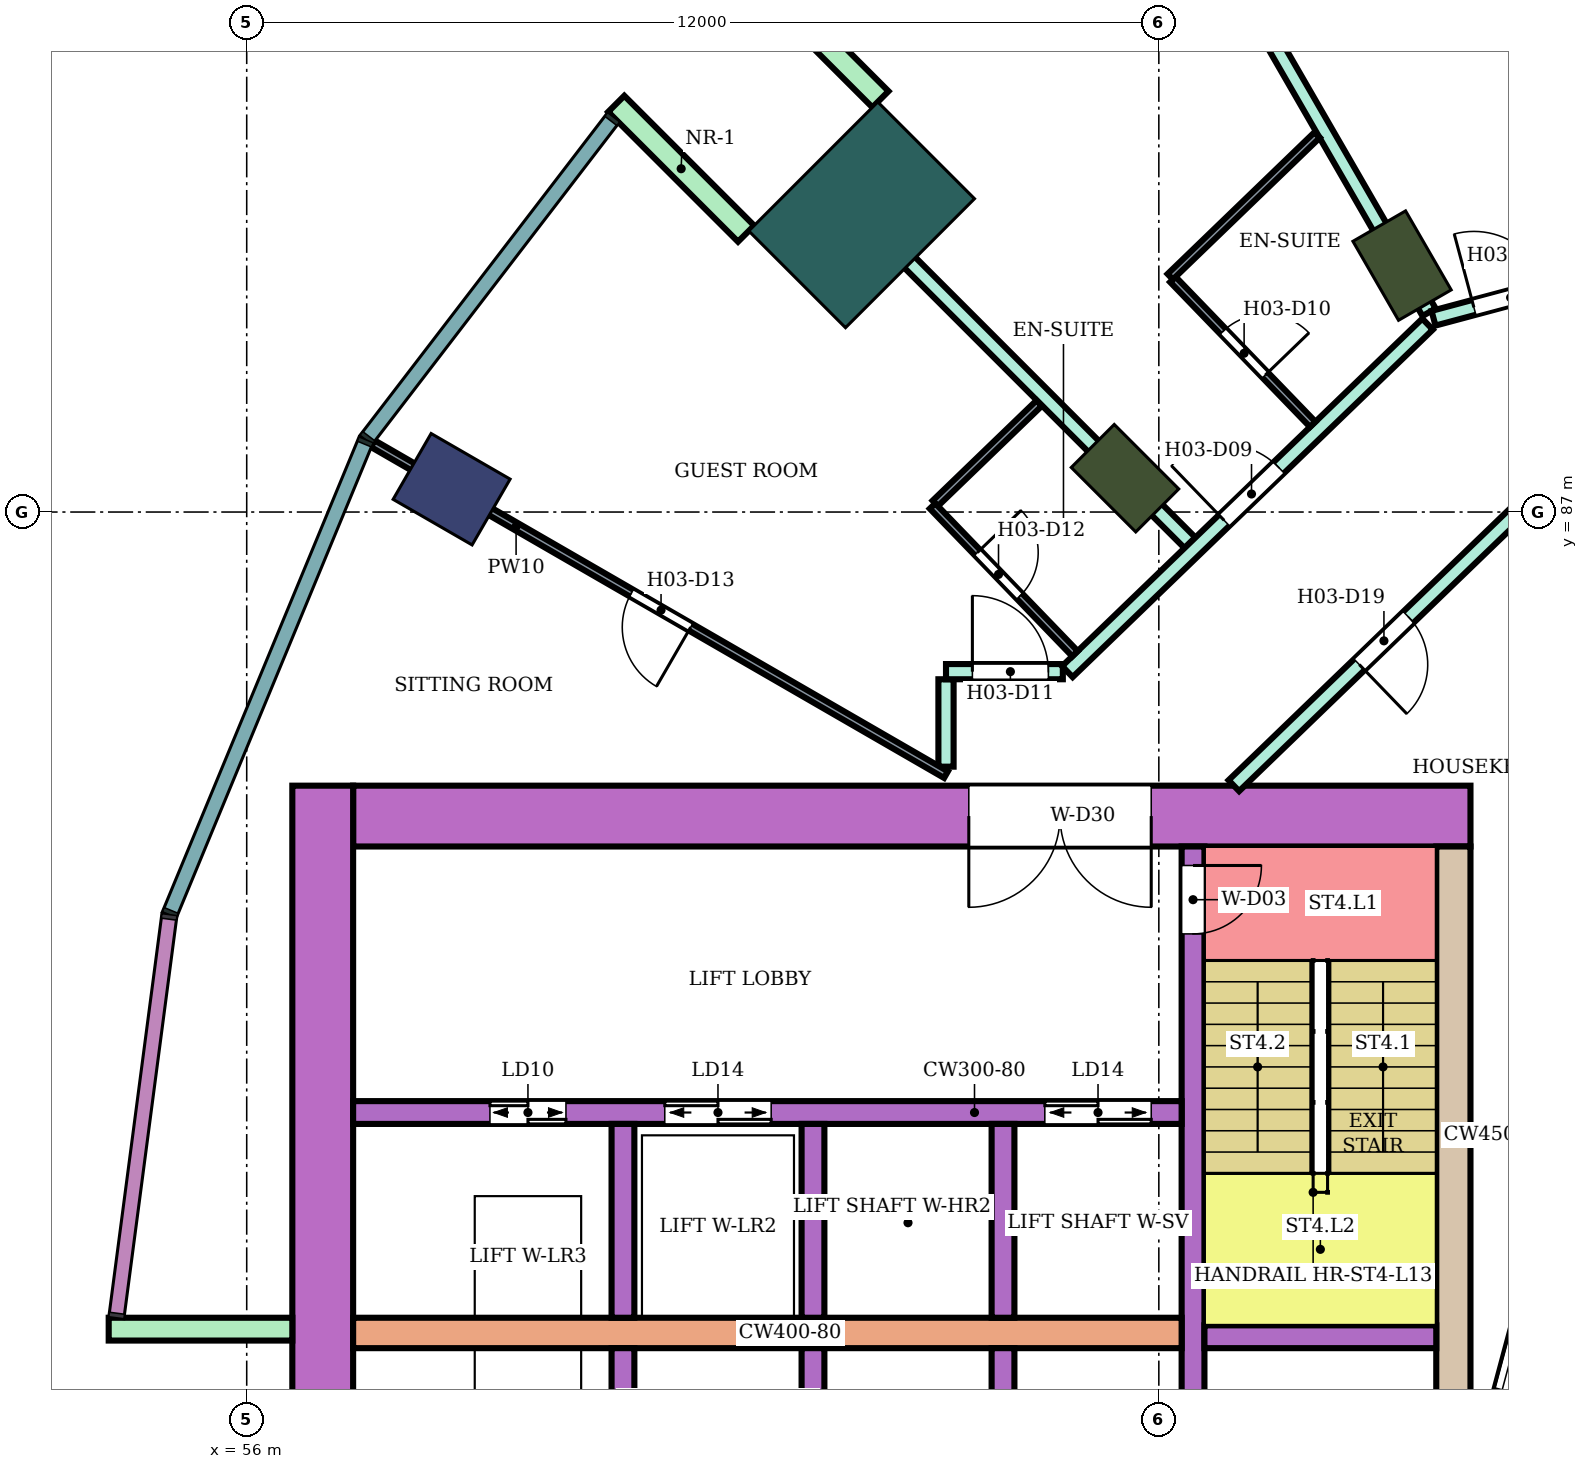
"""IFC4 building model, lengths in metres.
Left out: names, types, materials, properties, quantities, classifications, styles, units other than length and angle.
Written with IfcOpenShell. Run it as: python <this file> out.ifc"""

import sys

from ifc_helpers import new_model, si_unit, direction, frame, frame_2d, origin, origin_2d, place, context, subcontext, project, spatial, rectangle, extrude, element, fill, save


model = new_model("IFC4")
c1 = context("Model", 3, precision=1e-05, world=origin(), true_north=direction((0.0, 1.0)))
c2 = subcontext(c1, "Body", "Model", "MODEL_VIEW")
j1 = project(units=[si_unit("LENGTHUNIT", "METRE"), si_unit("PLANEANGLEUNIT", "RADIAN")], contexts=[c1])
p1 = place(None, origin())
s1 = spatial("IfcSite", under=j1, at=p1, CompositionType="ELEMENT")
p2 = place(p1, origin())
s2 = spatial("IfcBuilding", under=s1, at=p2, CompositionType="ELEMENT")
p3 = place(p2, frame((0.0, 0.0, 59.2)))
s3 = spatial("IfcBuildingStorey", under=s2, at=p3, CompositionType="ELEMENT", Elevation=59.2)
p4 = place(p3, frame((58.696, 87.3, 0.0), z_axis=(0.0, 0.0, 1.0), x_axis=(-0.866025403784, 0.5, 0.0)))
e1 = element("IfcColumn", 1, at=p4, inside=s3, PredefinedType="COLUMN", context=c2, shape_type="SweptSolid", body=[
    extrude(rectangle(XDim=1.2, YDim=1.0, at=origin_2d()), origin(), (0.0, 0.0, 1.0), 3.8),
])
for number, where, z_axis, x_axis in (
    (2, (71.2, 90.242, 0.0), (0.0, 0.0, 1.0), (-0.5, 0.866, 0.0)),
    (3, (67.555, 87.445, 0.0), (0.0, 0.0, 1.0), (-0.707, 0.707, 0.0)),
):
    element("IfcColumn", number, at=place(p3, frame(where, z_axis=z_axis, x_axis=x_axis)), inside=s3, PredefinedType="COLUMN", context=c2, shape_type="SweptSolid", body=[
        extrude(rectangle(XDim=1.2, YDim=0.8, at=origin_2d()), origin(), (0.0, 0.0, 1.0), 3.8),
    ])
p5 = place(p3, frame((64.09, 90.91, 0.0), z_axis=(0.0, 0.0, 1.0), x_axis=(-0.707106781187, 0.707106781187, 0.0)))
e4 = element("IfcColumn", 4, at=p5, inside=s3, PredefinedType="COLUMN", context=c2, shape_type="SweptSolid", body=[
    extrude(rectangle(XDim=1.8, YDim=2.4, at=origin_2d()), origin(), (0.0, 0.0, 1.0), 3.8),
])
p6 = place(p3, frame((72.1, 83.0, 0.0), z_axis=(0.0, 0.0, 1.0), x_axis=(-1.0, 0.0, 0.0)))
e5 = element("IfcWall", 5, at=p6, inside=s3, PredefinedType="SHEAR", context=c2, shape_type="SweptSolid", body=[
    extrude(rectangle(XDim=14.7, YDim=0.8, at=frame_2d((7.35, 0.0))), origin(), (0.0, 0.0, 1.0), 3.48),
])
p7 = place(p6, frame((4.2, 0.0, 0.0)))
e6 = element("IfcOpeningElement", 6, at=p7, cuts=e5, PredefinedType="OPENING", context=c2, shape_type="SweptSolid", body=[
    extrude(rectangle(XDim=2.4, YDim=2.4, at=frame_2d((1.2, 1.2))), frame((0.0, 0.41, 0.0), z_axis=(0.0, -1.0, 0.0), x_axis=(1.0, 0.0, 0.0)), (0.0, 0.0, 1.0), 0.82),
])
p8 = place(p3, frame((71.875, 82.6, 0.0), z_axis=(0.0, 0.0, 1.0), x_axis=(0.0, -1.0, 0.0)))
e7 = element("IfcWall", 7, at=p8, inside=s3, PredefinedType="SHEAR", context=c2, shape_type="SweptSolid", body=[
    extrude(rectangle(XDim=7.6, YDim=0.45, at=frame_2d((3.8, 0.0))), origin(), (0.0, 0.0, 1.0), 3.48),
])
p9 = place(p3, frame((57.0, 83.4, 0.0), z_axis=(0.0, 0.0, 1.0), x_axis=(0.0, -1.0, 0.0)))
e8 = element("IfcWall", 8, at=p9, inside=s3, PredefinedType="SHEAR", context=c2, shape_type="SweptSolid", body=[
    extrude(rectangle(XDim=16.8, YDim=0.8, at=frame_2d((8.4, 0.0))), origin(), (0.0, 0.0, 1.0), 3.48),
])
p10 = place(p3, frame((68.45, 82.6, 0.0), z_axis=(0.0, 0.0, 1.0), x_axis=(0.0, -1.0, 0.0)))
e9 = element("IfcWall", 9, at=p10, inside=s3, PredefinedType="SHEAR", context=c2, shape_type="SweptSolid", body=[
    extrude(rectangle(XDim=7.6, YDim=0.3, at=frame_2d((3.8, 0.0))), origin(), (0.0, 0.0, 1.0), 3.48),
])
p11 = place(p10, frame((0.25, 0.0, 0.0)))
e10 = element("IfcOpeningElement", 10, at=p11, cuts=e9, PredefinedType="OPENING", context=c2, shape_type="SweptSolid", body=[
    extrude(rectangle(XDim=0.9, YDim=2.1, at=frame_2d((0.45, 1.05))), frame((0.0, 0.16, 0.0), z_axis=(0.0, -1.0, 0.0), x_axis=(1.0, 0.0, 0.0)), (0.0, 0.0, 1.0), 0.32),
])
p12 = place(p3, frame((71.65, 76.15, 0.0), z_axis=(0.0, 0.0, 1.0), x_axis=(-1.0, 0.0, 0.0)))
e11 = element("IfcWall", 11, at=p12, inside=s3, PredefinedType="SHEAR", context=c2, shape_type="SweptSolid", body=[
    extrude(rectangle(XDim=3.05, YDim=0.3, at=frame_2d((1.525, 0.0))), origin(), (0.0, 0.0, 1.0), 3.48),
])
p13 = place(p3, frame((68.3, 76.2, 0.0), z_axis=(0.0, 0.0, 1.0), x_axis=(-1.0, 0.0, 0.0)))
e12 = element("IfcWall", 12, at=p13, inside=s3, PredefinedType="SHEAR", context=c2, shape_type="SweptSolid", body=[
    extrude(rectangle(XDim=10.9, YDim=0.4, at=frame_2d((5.45, 0.0))), origin(), (0.0, 0.0, 1.0), 3.48),
])
p14 = place(p3, frame((68.3, 79.1, 0.0), z_axis=(0.0, 0.0, 1.0), x_axis=(-1.0, 0.0, 0.0)))
e13 = element("IfcWall", 13, at=p14, inside=s3, PredefinedType="SHEAR", context=c2, shape_type="SweptSolid", body=[
    extrude(rectangle(XDim=10.9, YDim=0.3, at=frame_2d((5.45, 0.0))), origin(), (0.0, 0.0, 1.0), 3.48),
])
p15 = place(p14, frame((0.4, 0.0, 0.0)))
e14 = element("IfcOpeningElement", 14, at=p15, cuts=e13, PredefinedType="OPENING", context=c2, shape_type="SweptSolid", body=[
    extrude(rectangle(XDim=1.4, YDim=2.1, at=frame_2d((0.7, 1.05))), frame((0.0, 0.16, 0.0), z_axis=(0.0, -1.0, 0.0), x_axis=(1.0, 0.0, 0.0)), (0.0, 0.0, 1.0), 0.32),
])
p16 = place(p14, frame((5.4, 0.0, 0.0)))
e15 = element("IfcOpeningElement", 15, at=p16, cuts=e13, PredefinedType="OPENING", context=c2, shape_type="SweptSolid", body=[
    extrude(rectangle(XDim=1.4, YDim=2.1, at=frame_2d((0.7, 1.05))), frame((0.0, 0.16, 0.0), z_axis=(0.0, -1.0, 0.0), x_axis=(1.0, 0.0, 0.0)), (0.0, 0.0, 1.0), 0.32),
])
p17 = place(p14, frame((8.1, 0.0, 0.0)))
e16 = element("IfcOpeningElement", 16, at=p17, cuts=e13, PredefinedType="OPENING", context=c2, shape_type="SweptSolid", body=[
    extrude(rectangle(XDim=1.0, YDim=2.1, at=frame_2d((0.5, 1.05))), frame((0.0, 0.16, 0.0), z_axis=(0.0, -1.0, 0.0), x_axis=(1.0, 0.0, 0.0)), (0.0, 0.0, 1.0), 0.32),
])
for number, where, z_axis, x_axis in (
    (17, (65.95, 76.0, 0.0), (0.0, 0.0, 1.0), (0.0, -1.0, 0.0)),
    (18, (63.45, 76.0, 0.0), (0.0, 0.0, 1.0), (0.0, -1.0, 0.0)),
    (19, (60.95, 76.0, 0.0), (0.0, 0.0, 1.0), (0.0, -1.0, 0.0)),
    (20, (65.95, 78.95, 0.0), (0.0, 0.0, 1.0), (0.0, -1.0, 0.0)),
    (21, (63.45, 78.95, 0.0), (0.0, 0.0, 1.0), (0.0, -1.0, 0.0)),
    (22, (60.95, 78.95, 0.0), (0.0, 0.0, 1.0), (0.0, -1.0, 0.0)),
):
    element("IfcWall", number, at=place(p3, frame(where, z_axis=z_axis, x_axis=x_axis)), inside=s3, PredefinedType="SHEAR", context=c2, shape_type="SweptSolid", body=[
        extrude(rectangle(XDim=2.55, YDim=0.3, at=frame_2d((1.275, 0.0))), origin(), (0.0, 0.0, 1.0), 3.48),
    ])
for number, where, z_axis, x_axis in (
    (23, (64.338, 92.43, 0.0), (0.0, 0.0, 1.0), (-0.707, 0.707, 0.0)),
    (24, (62.57, 90.662, 0.0), (0.0, 0.0, 1.0), (-0.707, 0.707, 0.0)),
    (25, (56.6, 76.25, 0.0), (0.0, 0.0, 1.0), (-1.0, 0.0, 0.0)),
):
    element("IfcWall", number, at=place(p3, frame(where, z_axis=z_axis, x_axis=x_axis)), inside=s3, PredefinedType="NOTDEFINED", context=c2, shape_type="SweptSolid", body=[
        extrude(rectangle(XDim=2.416, YDim=0.3, at=frame_2d((1.208, 0.0))), origin(), (0.0, 0.0, 1.0), 3.8),
    ])
p18 = place(p3, frame((73.415, 78.802, 0.0), z_axis=(0.0, 0.0, 1.0), x_axis=(-0.258789828301, -0.965933654434, 0.0)))
e26 = element("IfcWall", 26, at=p18, inside=s3, PredefinedType="NOTDEFINED", context=c2, shape_type="SweptSolid", body=[
    extrude(rectangle(XDim=3.936, YDim=0.2, at=frame_2d((1.968, 0.0))), origin(), (0.0, 0.0, 1.0), 3.8),
])
p19 = place(p18, frame((0.468, 0.0, 0.9)))
e27 = element("IfcOpeningElement", 27, at=p19, cuts=e26, PredefinedType="OPENING", context=c2, shape_type="SweptSolid", body=[
    extrude(rectangle(XDim=3.0, YDim=2.3, at=frame_2d((1.5, 1.15))), frame((0.0, 0.11, 0.0), z_axis=(0.0, -1.0, 0.0), x_axis=(1.0, 0.0, 0.0)), (0.0, 0.0, 1.0), 0.22),
])
p20 = place(p3, frame((63.598, 91.408, 0.0), z_axis=(0.0, 0.0, 1.0), x_axis=(0.706999146394, -0.707214399597, 0.0)))
e28 = element("IfcWall", 28, at=p20, inside=s3, PredefinedType="PARTITIONING", context=c2, shape_type="SweptSolid", body=[
    extrude(rectangle(XDim=6.805, YDim=0.2, at=frame_2d((3.403, 0.0))), origin(), (0.0, 0.0, 1.0), 3.35),
])
p21 = place(p3, frame((65.2, 83.65, 0.0), z_axis=(0.0, 0.0, 1.0), x_axis=(0.0, 1.0, 0.0)))
e29 = element("IfcWall", 29, at=p21, inside=s3, PredefinedType="PARTITIONING", context=c2, shape_type="SweptSolid", body=[
    extrude(rectangle(XDim=1.15, YDim=0.2, at=frame_2d((0.575, 0.0))), origin(), (0.0, 0.0, 1.0), 3.35),
])
p22 = place(p3, frame((65.2, 84.9, 0.0), z_axis=(0.0, 0.0, 1.0), x_axis=(1.0, 0.0, 0.0)))
e30 = element("IfcWall", 30, at=p22, inside=s3, PredefinedType="PARTITIONING", context=c2, shape_type="SweptSolid", body=[
    extrude(rectangle(XDim=1.537, YDim=0.2, at=frame_2d((0.769, 0.0))), origin(), (0.0, 0.0, 1.0), 3.35),
])
p23 = place(p22, frame((0.347, 0.0, 0.0)))
e31 = element("IfcOpeningElement", 31, at=p23, cuts=e30, PredefinedType="OPENING", context=c2, shape_type="SweptSolid", body=[
    extrude(rectangle(XDim=1.0, YDim=2.1, at=frame_2d((0.5, 1.05))), frame((0.0, 0.11, 0.0), z_axis=(0.0, -1.0, 0.0), x_axis=(1.0, 0.0, 0.0)), (0.0, 0.0, 1.0), 0.22),
])
p24 = place(p3, frame((66.797, 84.9, 0.0), z_axis=(0.0, 0.0, 1.0), x_axis=(0.719692092412, 0.694293376116, 0.0)))
e32 = element("IfcWall", 32, at=p24, inside=s3, PredefinedType="PARTITIONING", context=c2, shape_type="SweptSolid", body=[
    extrude(rectangle(XDim=6.584, YDim=0.2, at=frame_2d((3.292, 0.0))), origin(), (0.0, 0.0, 1.0), 3.35),
])
p25 = place(p24, frame((2.866, 0.0, 0.0)))
e33 = element("IfcOpeningElement", 33, at=p25, cuts=e32, PredefinedType="OPENING", context=c2, shape_type="SweptSolid", body=[
    extrude(rectangle(XDim=1.0, YDim=2.1, at=frame_2d((0.5, 1.05))), frame((0.0, 0.11, 0.0), z_axis=(0.0, -1.0, 0.0), x_axis=(1.0, 0.0, 0.0)), (0.0, 0.0, 1.0), 0.22),
])
p26 = place(p3, frame((67.103, 97.342, 0.0), z_axis=(0.0, 0.0, 1.0), x_axis=(0.499906738326, -0.866079241742, 0.0)))
e34 = element("IfcWall", 34, at=p26, inside=s3, PredefinedType="PARTITIONING", context=c2, shape_type="SweptSolid", body=[
    extrude(rectangle(XDim=8.907, YDim=0.2, at=frame_2d((4.454, 0.0))), origin(), (0.0, 0.0, 1.0), 3.35),
])
p27 = place(p3, frame((68.987, 83.4, 0.0), z_axis=(0.0, 0.0, 1.0), x_axis=(0.719547721855, 0.694442996922, 0.0)))
e35 = element("IfcWall", 35, at=p27, inside=s3, PredefinedType="PARTITIONING", context=c2, shape_type="SweptSolid", body=[
    extrude(rectangle(XDim=5.378, YDim=0.2, at=frame_2d((2.689, 0.0))), origin(), (0.0, 0.0, 1.0), 3.35),
])
p28 = place(p27, frame((2.294, 0.0, 0.0)))
e36 = element("IfcOpeningElement", 36, at=p28, cuts=e35, PredefinedType="OPENING", context=c2, shape_type="SweptSolid", body=[
    extrude(rectangle(XDim=0.9, YDim=2.1, at=frame_2d((0.45, 1.05))), frame((0.0, 0.11, 0.0), z_axis=(0.0, -1.0, 0.0), x_axis=(1.0, 0.0, 0.0)), (0.0, 0.0, 1.0), 0.22),
])
p29 = place(p3, frame((71.614, 89.55, 0.0), z_axis=(0.0, 0.0, 1.0), x_axis=(0.965967958589, 0.258661753994, 0.0)))
e37 = element("IfcWall", 37, at=p29, inside=s3, PredefinedType="PARTITIONING", context=c2, shape_type="SweptSolid", body=[
    extrude(rectangle(XDim=8.592, YDim=0.2, at=frame_2d((4.296, 0.0))), origin(), (0.0, 0.0, 1.0), 3.35),
])
p30 = place(p29, frame((0.55, 0.0, 0.0)))
e38 = element("IfcOpeningElement", 38, at=p30, cuts=e37, PredefinedType="OPENING", context=c2, shape_type="SweptSolid", body=[
    extrude(rectangle(XDim=1.0, YDim=2.1, at=frame_2d((0.5, 1.05))), frame((0.0, 0.11, 0.0), z_axis=(0.0, -1.0, 0.0), x_axis=(1.0, 0.0, 0.0)), (0.0, 0.0, 1.0), 0.22),
])
p31 = place(p3, frame((57.659, 87.899, 0.0), z_axis=(0.0, 0.0, 1.0), x_axis=(0.86602264145, -0.500004784474, 0.0)))
e39 = element("IfcWall", 39, at=p31, inside=s3, PredefinedType="PARTITIONING", context=c2, shape_type="SweptSolid", body=[
    extrude(rectangle(XDim=8.708, YDim=0.1, at=frame_2d((4.354, 0.0))), origin(), (0.0, 0.0, 1.0), 3.35),
])
p32 = place(p31, frame((3.929, 0.0, 0.0)))
e40 = element("IfcOpeningElement", 40, at=p32, cuts=e39, PredefinedType="OPENING", context=c2, shape_type="SweptSolid", body=[
    extrude(rectangle(XDim=0.9, YDim=2.1, at=frame_2d((0.45, 1.05))), frame((0.0, 0.06, 0.0), z_axis=(0.0, -1.0, 0.0), x_axis=(1.0, 0.0, 0.0)), (0.0, 0.0, 1.0), 0.12),
])
p33 = place(p3, frame((65.059, 87.114, 0.0), z_axis=(0.0, 0.0, 1.0), x_axis=(0.719715847356, 0.694268751324, 0.0)))
e41 = element("IfcWall", 41, at=p33, inside=s3, PredefinedType="PARTITIONING", context=c2, shape_type="SweptSolid", body=[
    extrude(rectangle(XDim=1.9, YDim=0.1, at=frame_2d((0.95, 0.0))), origin(), (0.0, 0.0, 1.0), 3.35),
])
p34 = place(p3, frame((65.023, 87.079, 0.0), z_axis=(0.0, 0.0, 1.0), x_axis=(0.694287838235, -0.719697434815, 0.0)))
e42 = element("IfcWall", 42, at=p34, inside=s3, PredefinedType="PARTITIONING", context=c2, shape_type="SweptSolid", body=[
    extrude(rectangle(XDim=2.7, YDim=0.1, at=frame_2d((1.35, 0.0))), origin(), (0.0, 0.0, 1.0), 3.35),
])
p35 = place(p34, frame((0.85, 0.0, 0.0)))
e43 = element("IfcOpeningElement", 43, at=p35, cuts=e42, PredefinedType="OPENING", context=c2, shape_type="SweptSolid", body=[
    extrude(rectangle(XDim=0.8, YDim=2.1, at=frame_2d((0.4, 1.05))), frame((0.0, 0.06, 0.0), z_axis=(0.0, -1.0, 0.0), x_axis=(1.0, 0.0, 0.0)), (0.0, 0.0, 1.0), 0.12),
])
p36 = place(p3, frame((68.185, 90.06, 0.0), z_axis=(0.0, 0.0, 1.0), x_axis=(0.69446127412, -0.719530081892, 0.0)))
e44 = element("IfcWall", 44, at=p36, inside=s3, PredefinedType="PARTITIONING", context=c2, shape_type="SweptSolid", body=[
    extrude(rectangle(XDim=2.649, YDim=0.1, at=frame_2d((1.324, 0.0))), origin(), (0.0, 0.0, 1.0), 3.35),
])
p37 = place(p36, frame((0.95, 0.0, 0.0)))
e45 = element("IfcOpeningElement", 45, at=p37, cuts=e44, PredefinedType="OPENING", context=c2, shape_type="SweptSolid", body=[
    extrude(rectangle(XDim=0.8, YDim=2.1, at=frame_2d((0.4, 1.05))), frame((0.0, 0.06, 0.0), z_axis=(0.0, -1.0, 0.0), x_axis=(1.0, 0.0, 0.0)), (0.0, 0.0, 1.0), 0.12),
])
p38 = place(p3, frame((68.15, 90.096, 0.0), z_axis=(0.0, 0.0, 1.0), x_axis=(0.719667544954, 0.694318820672, 0.0)))
e46 = element("IfcWall", 46, at=p38, inside=s3, PredefinedType="PARTITIONING", context=c2, shape_type="SweptSolid", body=[
    extrude(rectangle(XDim=2.687, YDim=0.1, at=frame_2d((1.344, 0.0))), origin(), (0.0, 0.0, 1.0), 3.35),
])
p39 = place(p19, origin())
e47 = element("IfcWindow", 47, at=p39, inside=s3, PartitioningType="SINGLE_PANEL", PredefinedType="WINDOW", context=c2, shape_type="SweptSolid", body=[
    extrude(rectangle(XDim=3.0, YDim=2.3, at=frame_2d((1.5, 1.15))), frame((0.0, 0.03, 0.0), z_axis=(0.0, -1.0, 0.0), x_axis=(1.0, 0.0, 0.0)), (0.0, 0.0, 1.0), 0.06),
])
fill(e27, e47)
p40 = place(p30, origin())
e48 = element("IfcDoor", 48, at=p40, inside=s3, OperationType="SINGLE_SWING_LEFT", PredefinedType="DOOR", context=c2, shape_type="SweptSolid", body=[
    extrude(rectangle(XDim=1.0, YDim=2.1, at=frame_2d((0.5, 1.05))), frame((0.0, 0.025, 0.0), z_axis=(0.0, -1.0, 0.0), x_axis=(1.0, 0.0, 0.0)), (0.0, 0.0, 1.0), 0.05),
])
fill(e38, e48)
p41 = place(p25, origin())
e49 = element("IfcDoor", 49, at=p41, inside=s3, OperationType="SINGLE_SWING_LEFT", PredefinedType="DOOR", context=c2, shape_type="SweptSolid", body=[
    extrude(rectangle(XDim=1.0, YDim=2.1, at=frame_2d((0.5, 1.05))), frame((0.0, 0.025, 0.0), z_axis=(0.0, -1.0, 0.0), x_axis=(1.0, 0.0, 0.0)), (0.0, 0.0, 1.0), 0.05),
])
fill(e33, e49)
p42 = place(p37, origin())
e50 = element("IfcDoor", 50, at=p42, inside=s3, OperationType="SINGLE_SWING_RIGHT", PredefinedType="DOOR", context=c2, shape_type="SweptSolid", body=[
    extrude(rectangle(XDim=0.8, YDim=2.1, at=frame_2d((0.4, 1.05))), frame((0.0, 0.025, 0.0), z_axis=(0.0, -1.0, 0.0), x_axis=(1.0, 0.0, 0.0)), (0.0, 0.0, 1.0), 0.05),
])
fill(e45, e50)
p43 = place(p23, origin())
e51 = element("IfcDoor", 51, at=p43, inside=s3, OperationType="SINGLE_SWING_LEFT", PredefinedType="DOOR", context=c2, shape_type="SweptSolid", body=[
    extrude(rectangle(XDim=1.0, YDim=2.1, at=frame_2d((0.5, 1.05))), frame((0.0, 0.025, 0.0), z_axis=(0.0, -1.0, 0.0), x_axis=(1.0, 0.0, 0.0)), (0.0, 0.0, 1.0), 0.05),
])
fill(e31, e51)
p44 = place(p35, origin())
e52 = element("IfcDoor", 52, at=p44, inside=s3, OperationType="SINGLE_SWING_LEFT", PredefinedType="DOOR", context=c2, shape_type="SweptSolid", body=[
    extrude(rectangle(XDim=0.8, YDim=2.1, at=frame_2d((0.4, 1.05))), frame((0.0, 0.025, 0.0), z_axis=(0.0, -1.0, 0.0), x_axis=(1.0, 0.0, 0.0)), (0.0, 0.0, 1.0), 0.05),
])
fill(e43, e52)
p45 = place(p32, frame((0.9, 0.0, 0.0), z_axis=(0.0, 0.0, 1.0), x_axis=(-1.0, 0.0, 0.0)))
e53 = element("IfcDoor", 53, at=p45, inside=s3, OperationType="SINGLE_SWING_LEFT", PredefinedType="DOOR", context=c2, shape_type="SweptSolid", body=[
    extrude(rectangle(XDim=0.9, YDim=2.1, at=frame_2d((0.45, 1.05))), frame((0.0, 0.025, 0.0), z_axis=(0.0, -1.0, 0.0), x_axis=(1.0, 0.0, 0.0)), (0.0, 0.0, 1.0), 0.05),
])
fill(e40, e53)
p46 = place(p28, frame((0.9, 0.0, 0.0), z_axis=(0.0, 0.0, 1.0), x_axis=(-1.0, 0.0, 0.0)))
e54 = element("IfcDoor", 54, at=p46, inside=s3, OperationType="SINGLE_SWING_RIGHT", PredefinedType="DOOR", context=c2, shape_type="SweptSolid", body=[
    extrude(rectangle(XDim=0.9, YDim=2.1, at=frame_2d((0.45, 1.05))), frame((0.0, 0.025, 0.0), z_axis=(0.0, -1.0, 0.0), x_axis=(1.0, 0.0, 0.0)), (0.0, 0.0, 1.0), 0.05),
])
fill(e36, e54)
p47 = place(p11, origin())
e55 = element("IfcDoor", 55, at=p47, inside=s3, OperationType="SINGLE_SWING_LEFT", PredefinedType="DOOR", context=c2, shape_type="SweptSolid", body=[
    extrude(rectangle(XDim=0.9, YDim=2.1, at=frame_2d((0.45, 1.05))), frame((0.0, 0.025, 0.0), z_axis=(0.0, -1.0, 0.0), x_axis=(1.0, 0.0, 0.0)), (0.0, 0.0, 1.0), 0.05),
])
fill(e10, e55)
p48 = place(p15, origin())
e56 = element("IfcDoor", 56, at=p48, inside=s3, OperationType="DOUBLE_DOOR_SLIDING", PredefinedType="DOOR", context=c2, shape_type="SweptSolid", body=[
    extrude(rectangle(XDim=1.4, YDim=2.1, at=frame_2d((0.7, 1.05))), frame((0.0, 0.025, 0.0), z_axis=(0.0, -1.0, 0.0), x_axis=(1.0, 0.0, 0.0)), (0.0, 0.0, 1.0), 0.05),
])
fill(e14, e56)
p49 = place(p16, origin())
e57 = element("IfcDoor", 57, at=p49, inside=s3, OperationType="DOUBLE_DOOR_SLIDING", PredefinedType="DOOR", context=c2, shape_type="SweptSolid", body=[
    extrude(rectangle(XDim=1.4, YDim=2.1, at=frame_2d((0.7, 1.05))), frame((0.0, 0.025, 0.0), z_axis=(0.0, -1.0, 0.0), x_axis=(1.0, 0.0, 0.0)), (0.0, 0.0, 1.0), 0.05),
])
fill(e15, e57)
p50 = place(p17, origin())
e58 = element("IfcDoor", 58, at=p50, inside=s3, OperationType="DOUBLE_DOOR_SLIDING", PredefinedType="DOOR", context=c2, shape_type="SweptSolid", body=[
    extrude(rectangle(XDim=1.0, YDim=2.1, at=frame_2d((0.5, 1.05))), frame((0.0, 0.025, 0.0), z_axis=(0.0, -1.0, 0.0), x_axis=(1.0, 0.0, 0.0)), (0.0, 0.0, 1.0), 0.05),
])
fill(e16, e58)
p51 = place(p7, origin())
e59 = element("IfcDoor", 59, at=p51, inside=s3, OperationType="DOUBLE_DOOR_SINGLE_SWING", PredefinedType="DOOR", context=c2, shape_type="SweptSolid", body=[
    extrude(rectangle(XDim=2.4, YDim=2.4, at=frame_2d((1.2, 1.2))), frame((0.0, 0.025, 0.0), z_axis=(0.0, -1.0, 0.0), x_axis=(1.0, 0.0, 0.0)), (0.0, 0.0, 1.0), 0.05),
])
fill(e6, e59)
save(model, sys.argv[1])
